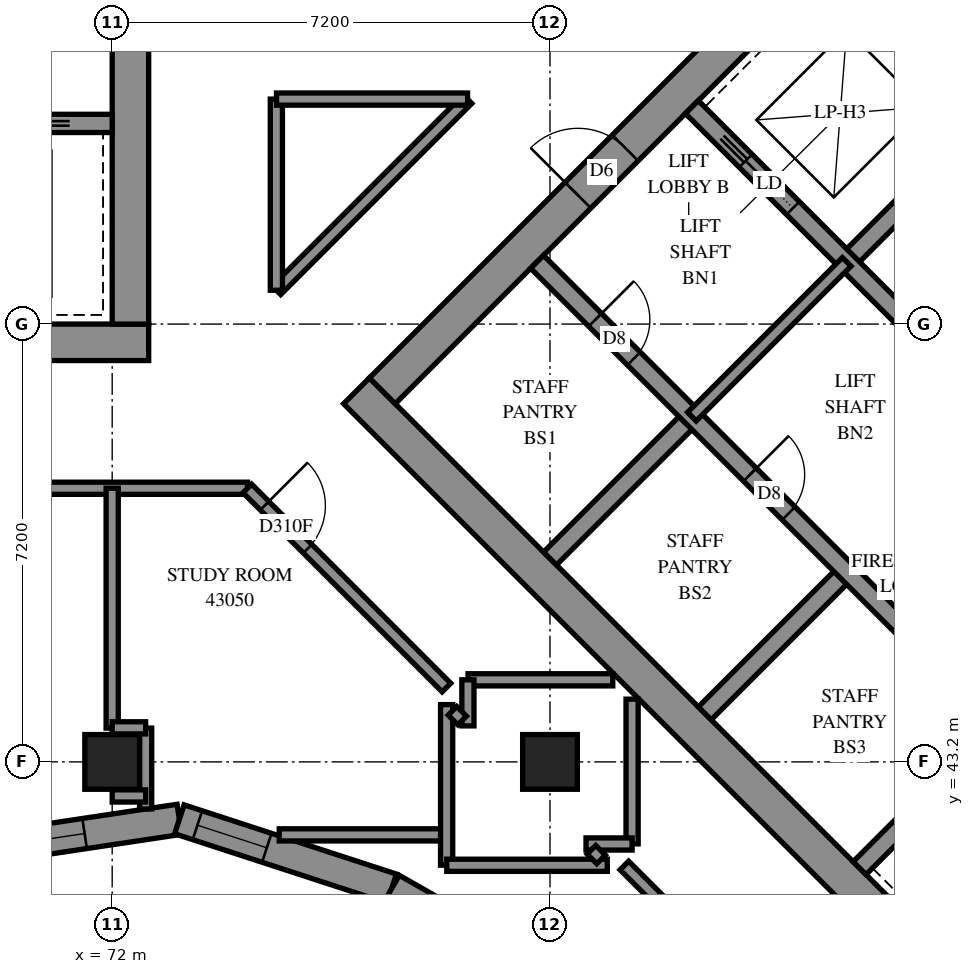
"""IFC4 building model, lengths in metres.
Left out: names, types, materials, properties, quantities, classifications, styles, units other than length and angle.
Written with IfcOpenShell. Run it as: python <this file> out.ifc"""

import sys

from ifc_helpers import new_model, si_unit, direction, frame, frame_2d, origin, origin_2d, place, context, subcontext, project, spatial, polyline, rectangle, outline, extrude, element, fill, save


model = new_model("IFC4")
c1 = context("Model", 3, precision=1e-05, world=origin(), true_north=direction((0.0, 1.0)))
c2 = subcontext(c1, "Body", "Model", "MODEL_VIEW")
j1 = project(units=[si_unit("LENGTHUNIT", "METRE"), si_unit("PLANEANGLEUNIT", "RADIAN")], contexts=[c1])
p1 = place(None, origin())
s1 = spatial("IfcSite", under=j1, at=p1, CompositionType="ELEMENT")
p2 = place(p1, origin())
s2 = spatial("IfcBuilding", under=s1, at=p2, CompositionType="ELEMENT")
p3 = place(p2, frame((0.0, 0.0, 159.2)))
s3 = spatial("IfcBuildingStorey", under=s2, at=p3, CompositionType="ELEMENT", Elevation=159.2)
for number, where, z_axis, x_axis in (
    (1, (72.0, 43.2, 0.0), (0.0, 0.0, 1.0), (1.0, 0.0, 0.0)),
    (2, (79.2, 43.2, 0.0), (0.0, 0.0, 1.0), (1.0, 0.0, 0.0)),
):
    element("IfcColumn", number, at=place(p3, frame(where, z_axis=z_axis, x_axis=x_axis)), inside=s3, PredefinedType="COLUMN", context=c2, shape_type="SweptSolid", body=[
        extrude(rectangle(XDim=0.9, YDim=0.9, at=origin_2d()), origin(), (0.0, 0.0, 1.0), 3.1),
    ])
p4 = place(p3, frame((57.0, 50.1, -0.3), z_axis=(0.0, 0.0, 1.0), x_axis=(1.0, 0.0, 0.0)))
e3 = element("IfcWall", 3, at=p4, inside=s3, PredefinedType="SHEAR", context=c2, shape_type="SweptSolid", body=[
    extrude(rectangle(XDim=15.6, YDim=0.6, at=frame_2d((7.8, 0.0))), origin(), (0.0, 0.0, 1.0), 2.7),
])
p5 = place(p3, frame((72.3, 50.4, -0.3), z_axis=(0.0, 0.0, 1.0), x_axis=(0.0, 1.0, 0.0)))
e4 = element("IfcWall", 4, at=p5, inside=s3, PredefinedType="SHEAR", context=c2, shape_type="SweptSolid", body=[
    extrude(rectangle(XDim=14.4, YDim=0.6, at=frame_2d((7.2, 0.0))), origin(), (0.0, 0.0, 1.0), 2.7),
])
p6 = place(p5, frame((4.55, 0.0, 0.3)))
e5 = element("IfcOpeningElement", 5, at=p6, cuts=e4, PredefinedType="OPENING", context=c2, shape_type="SweptSolid", body=[
    extrude(rectangle(XDim=1.1, YDim=2.1, at=frame_2d((0.55, 1.05))), frame((0.0, 0.31, 0.0), z_axis=(0.0, -1.0, 0.0), x_axis=(1.0, 0.0, 0.0)), (0.0, 0.0, 1.0), 0.62),
])
p7 = place(p5, frame((11.35, 0.0, 0.3)))
e6 = element("IfcOpeningElement", 6, at=p7, cuts=e4, PredefinedType="OPENING", context=c2, shape_type="SweptSolid", body=[
    extrude(rectangle(XDim=1.1, YDim=2.1, at=frame_2d((0.55, 1.05))), frame((0.0, 0.31, 0.0), z_axis=(0.0, -1.0, 0.0), x_axis=(1.0, 0.0, 0.0)), (0.0, 0.0, 1.0), 0.62),
])
p8 = place(p3, frame((57.6, 53.7, 0.0), z_axis=(0.0, 0.0, 1.0), x_axis=(1.0, 0.0, 0.0)))
e7 = element("IfcWall", 7, at=p8, inside=s3, PredefinedType="SOLIDWALL", context=c2, shape_type="SweptSolid", body=[
    extrude(rectangle(XDim=14.4, YDim=0.3, at=frame_2d((7.2, 0.0))), origin(), (0.0, 0.0, 1.0), 3.1),
])
p9 = place(p8, frame((1.35, 0.0, 0.0)))
e8 = element("IfcOpeningElement", 8, at=p9, cuts=e7, PredefinedType="OPENING", context=c2, shape_type="SweptSolid", body=[
    extrude(rectangle(XDim=0.9, YDim=2.1, at=frame_2d((0.45, 1.05))), frame((0.0, 0.16, 0.0), z_axis=(0.0, -1.0, 0.0), x_axis=(1.0, 0.0, 0.0)), (0.0, 0.0, 1.0), 0.32),
])
p10 = place(p8, frame((4.95, 0.0, 0.0)))
e9 = element("IfcOpeningElement", 9, at=p10, cuts=e7, PredefinedType="OPENING", context=c2, shape_type="SweptSolid", body=[
    extrude(rectangle(XDim=0.9, YDim=2.1, at=frame_2d((0.45, 1.05))), frame((0.0, 0.16, 0.0), z_axis=(0.0, -1.0, 0.0), x_axis=(1.0, 0.0, 0.0)), (0.0, 0.0, 1.0), 0.32),
])
p11 = place(p8, frame((8.55, 0.0, 0.0)))
e10 = element("IfcOpeningElement", 10, at=p11, cuts=e7, PredefinedType="OPENING", context=c2, shape_type="SweptSolid", body=[
    extrude(rectangle(XDim=0.9, YDim=2.1, at=frame_2d((0.45, 1.05))), frame((0.0, 0.16, 0.0), z_axis=(0.0, -1.0, 0.0), x_axis=(1.0, 0.0, 0.0)), (0.0, 0.0, 1.0), 0.32),
])
p12 = place(p8, frame((12.05, 0.0, 0.0)))
e11 = element("IfcOpeningElement", 11, at=p12, cuts=e7, PredefinedType="OPENING", context=c2, shape_type="SweptSolid", body=[
    extrude(rectangle(XDim=1.1, YDim=2.1, at=frame_2d((0.55, 1.05))), frame((0.0, 0.16, 0.0), z_axis=(0.0, -1.0, 0.0), x_axis=(1.0, 0.0, 0.0)), (0.0, 0.0, 1.0), 0.32),
])
p13 = place(p3, frame((76.018, 49.302, -0.3), z_axis=(0.0, 0.0, 1.0), x_axis=(0.7071067812, -0.7071067812, 0.0)))
e12 = element("IfcWall", 12, at=p13, inside=s3, PredefinedType="SHEAR", context=c2, shape_type="SweptSolid", body=[
    extrude(rectangle(XDim=15.6, YDim=0.6, at=frame_2d((7.8, 0.0))), origin(), (0.0, 0.0, 1.0), 2.7),
])
p14 = place(p3, frame((76.442, 49.302, -0.3), z_axis=(0.0, 0.0, 1.0), x_axis=(0.7071067812, 0.7071067812, 0.0)))
e13 = element("IfcWall", 13, at=p14, inside=s3, PredefinedType="SHEAR", context=c2, shape_type="SweptSolid", body=[
    extrude(rectangle(XDim=14.4, YDim=0.6, at=frame_2d((7.2, 0.0))), origin(), (0.0, 0.0, 1.0), 2.7),
])
p15 = place(p14, frame((4.55, 0.0, 0.3)))
e14 = element("IfcOpeningElement", 14, at=p15, cuts=e13, PredefinedType="OPENING", context=c2, shape_type="SweptSolid", body=[
    extrude(rectangle(XDim=1.1, YDim=2.1, at=frame_2d((0.55, 1.05))), frame((0.0, 0.31, 0.0), z_axis=(0.0, -1.0, 0.0), x_axis=(1.0, 0.0, 0.0)), (0.0, 0.0, 1.0), 0.62),
])
p16 = place(p14, frame((11.35, 0.0, 0.3)))
e15 = element("IfcOpeningElement", 15, at=p16, cuts=e13, PredefinedType="OPENING", context=c2, shape_type="SweptSolid", body=[
    extrude(rectangle(XDim=1.1, YDim=2.1, at=frame_2d((0.55, 1.05))), frame((0.0, 0.31, 0.0), z_axis=(0.0, -1.0, 0.0), x_axis=(1.0, 0.0, 0.0)), (0.0, 0.0, 1.0), 0.62),
])
for number, where, z_axis, x_axis in (
    (16, (79.2, 46.544, 0.0), (0.0, 0.0, 1.0), (0.707, 0.707, 0.0)),
    (17, (84.079, 51.423, 0.0), (0.0, 0.0, 1.0), (0.707, 0.707, 0.0)),
):
    element("IfcWall", number, at=place(p3, frame(where, z_axis=z_axis, x_axis=x_axis)), inside=s3, PredefinedType="SOLIDWALL", context=c2, shape_type="SweptSolid", body=[
        extrude(rectangle(XDim=3.3, YDim=0.3, at=frame_2d((1.65, 0.0))), origin(), (0.0, 0.0, 1.0), 3.1),
    ])
for number, where, z_axis, x_axis in (
    (18, (81.746, 43.999, 0.0), (0.0, 0.0, 1.0), (0.707, 0.707, 0.0)),
    (19, (84.291, 41.453, 0.0), (0.0, 0.0, 1.0), (0.707, 0.707, 0.0)),
):
    element("IfcWall", number, at=place(p3, frame(where, z_axis=z_axis, x_axis=x_axis)), inside=s3, PredefinedType="SOLIDWALL", context=c2, shape_type="SweptSolid", body=[
        extrude(rectangle(XDim=3.3, YDim=0.3, at=frame_2d((1.65, 0.0))), origin(), (0.0, 0.0, 1.0), 3.1),
    ])
p17 = place(p3, frame((78.988, 51.423, 0.0), z_axis=(0.0, 0.0, 1.0), x_axis=(0.7071067812, -0.7071067812, 0.0)))
e20 = element("IfcWall", 20, at=p17, inside=s3, PredefinedType="SOLIDWALL", context=c2, shape_type="SweptSolid", body=[
    extrude(rectangle(XDim=14.4, YDim=0.3, at=frame_2d((7.2, 0.0))), origin(), (0.0, 0.0, 1.0), 3.1),
])
p18 = place(p17, frame((1.35, 0.0, 0.0)))
e21 = element("IfcOpeningElement", 21, at=p18, cuts=e20, PredefinedType="OPENING", context=c2, shape_type="SweptSolid", body=[
    extrude(rectangle(XDim=0.9, YDim=2.1, at=frame_2d((0.45, 1.05))), frame((0.0, 0.16, 0.0), z_axis=(0.0, -1.0, 0.0), x_axis=(1.0, 0.0, 0.0)), (0.0, 0.0, 1.0), 0.32),
])
p19 = place(p17, frame((4.95, 0.0, 0.0)))
e22 = element("IfcOpeningElement", 22, at=p19, cuts=e20, PredefinedType="OPENING", context=c2, shape_type="SweptSolid", body=[
    extrude(rectangle(XDim=0.9, YDim=2.1, at=frame_2d((0.45, 1.05))), frame((0.0, 0.16, 0.0), z_axis=(0.0, -1.0, 0.0), x_axis=(1.0, 0.0, 0.0)), (0.0, 0.0, 1.0), 0.32),
])
p20 = place(p17, frame((8.55, 0.0, 0.0)))
e23 = element("IfcOpeningElement", 23, at=p20, cuts=e20, PredefinedType="OPENING", context=c2, shape_type="SweptSolid", body=[
    extrude(rectangle(XDim=0.9, YDim=2.1, at=frame_2d((0.45, 1.05))), frame((0.0, 0.16, 0.0), z_axis=(0.0, -1.0, 0.0), x_axis=(1.0, 0.0, 0.0)), (0.0, 0.0, 1.0), 0.32),
])
p21 = place(p17, frame((12.05, 0.0, 0.0)))
e24 = element("IfcOpeningElement", 24, at=p21, cuts=e20, PredefinedType="OPENING", context=c2, shape_type="SweptSolid", body=[
    extrude(rectangle(XDim=1.1, YDim=2.1, at=frame_2d((0.55, 1.05))), frame((0.0, 0.16, 0.0), z_axis=(0.0, -1.0, 0.0), x_axis=(1.0, 0.0, 0.0)), (0.0, 0.0, 1.0), 0.32),
])
p22 = place(p3, frame((81.534, 53.969, 0.0), z_axis=(0.0, 0.0, 1.0), x_axis=(0.707103309, -0.7071102534, 0.0)))
e25 = element("IfcWall", 25, at=p22, inside=s3, PredefinedType="SOLIDWALL", context=c2, shape_type="SweptSolid", body=[
    extrude(rectangle(XDim=14.4, YDim=0.3, at=frame_2d((7.2, 0.0))), origin(), (0.0, 0.0, 1.0), 3.1),
])
p23 = place(p22, frame((1.25, 0.0, 0.0)))
e26 = element("IfcOpeningElement", 26, at=p23, cuts=e25, PredefinedType="OPENING", context=c2, shape_type="SweptSolid", body=[
    extrude(rectangle(XDim=1.1, YDim=2.1, at=frame_2d((0.55, 1.05))), frame((0.0, 0.16, 0.0), z_axis=(0.0, -1.0, 0.0), x_axis=(1.0, 0.0, 0.0)), (0.0, 0.0, 1.0), 0.32),
])
p24 = place(p22, frame((4.85, 0.0, 0.0)))
e27 = element("IfcOpeningElement", 27, at=p24, cuts=e25, PredefinedType="OPENING", context=c2, shape_type="SweptSolid", body=[
    extrude(rectangle(XDim=1.1, YDim=2.1, at=frame_2d((0.55, 1.05))), frame((0.0, 0.16, 0.0), z_axis=(0.0, -1.0, 0.0), x_axis=(1.0, 0.0, 0.0)), (0.0, 0.0, 1.0), 0.32),
])
p25 = place(p22, frame((8.45, 0.0, 0.0)))
e28 = element("IfcOpeningElement", 28, at=p25, cuts=e25, PredefinedType="OPENING", context=c2, shape_type="SweptSolid", body=[
    extrude(rectangle(XDim=1.1, YDim=2.1, at=frame_2d((0.55, 1.05))), frame((0.0, 0.16, 0.0), z_axis=(0.0, -1.0, 0.0), x_axis=(1.0, 0.0, 0.0)), (0.0, 0.0, 1.0), 0.32),
])
p26 = place(p22, frame((12.05, 0.0, 0.0)))
e29 = element("IfcOpeningElement", 29, at=p26, cuts=e25, PredefinedType="OPENING", context=c2, shape_type="SweptSolid", body=[
    extrude(rectangle(XDim=1.1, YDim=2.1, at=frame_2d((0.55, 1.05))), frame((0.0, 0.16, 0.0), z_axis=(0.0, -1.0, 0.0), x_axis=(1.0, 0.0, 0.0)), (0.0, 0.0, 1.0), 0.32),
])
p27 = place(p3, frame((83.867, 56.302, 0.0), z_axis=(0.0, 0.0, 1.0), x_axis=(0.7071137256, -0.7070998367, 0.0)))
e30 = element("IfcWall", 30, at=p27, inside=s3, PredefinedType="SOLIDWALL", context=c2, shape_type="SweptSolid", body=[
    extrude(rectangle(XDim=7.2, YDim=0.3, at=frame_2d((3.6, 0.0))), origin(), (0.0, 0.0, 1.0), 3.1),
])
p28 = place(p3, frame((69.671, 41.741, 0.0), z_axis=(0.0, 0.0, 1.0), x_axis=(0.9889270545, 0.1484024288, 0.0)))
e31 = element("IfcWall", 31, at=p28, inside=s3, PredefinedType="SOLIDWALL", context=c2, shape_type="SweptSolid", body=[
    extrude(outline(polyline([(-0.037, -0.25), (3.413, -0.25), (3.531, 0.25), (0.037, 0.25), (-0.037, -0.25)])), origin(), (0.0, 0.0, 1.0), 3.1),
])
p29 = place(p28, frame((0.696, 0.0, 0.45)))
e32 = element("IfcOpeningElement", 32, at=p29, cuts=e31, PredefinedType="OPENING", context=c2, shape_type="SweptSolid", body=[
    extrude(rectangle(XDim=1.2, YDim=2.5, at=frame_2d((0.6, 1.25))), frame((0.0, 0.26, 0.0), z_axis=(0.0, -1.0, 0.0), x_axis=(1.0, 0.0, 0.0)), (0.0, 0.0, 1.0), 0.52),
])
p30 = place(p3, frame((73.105, 42.256, 0.0), z_axis=(0.0, 0.0, 1.0), x_axis=(0.9507748373, -0.3098825725, 0.0)))
e33 = element("IfcWall", 33, at=p30, inside=s3, PredefinedType="SOLIDWALL", context=c2, shape_type="SweptSolid", body=[
    extrude(outline(polyline([(0.059, -0.25), (3.648, -0.25), (3.698, 0.25), (-0.059, 0.25), (0.059, -0.25)])), origin(), (0.0, 0.0, 1.0), 3.1),
])
p31 = place(p30, frame((0.312, 0.0, 0.45)))
e34 = element("IfcOpeningElement", 34, at=p31, cuts=e33, PredefinedType="OPENING", context=c2, shape_type="SweptSolid", body=[
    extrude(rectangle(XDim=1.2, YDim=2.5, at=frame_2d((0.6, 1.25))), frame((0.0, 0.26, 0.0), z_axis=(0.0, -1.0, 0.0), x_axis=(1.0, 0.0, 0.0)), (0.0, 0.0, 1.0), 0.52),
])
p32 = place(p3, frame((76.597, 41.118, 0.0), z_axis=(0.0, 0.0, 1.0), x_axis=(0.8690276155, -0.4947635835, 0.0)))
e35 = element("IfcWall", 35, at=p32, inside=s3, PredefinedType="SOLIDWALL", context=c2, shape_type="SweptSolid", body=[
    extrude(outline(polyline([(0.025, -0.25), (4.227, -0.25), (4.327, 0.25), (-0.025, 0.25), (0.025, -0.25)])), origin(), (0.0, 0.0, 1.0), 3.1),
])
p33 = place(p32, frame((0.732, 0.0, 0.45)))
e36 = element("IfcOpeningElement", 36, at=p33, cuts=e35, PredefinedType="OPENING", context=c2, shape_type="SweptSolid", body=[
    extrude(rectangle(XDim=1.2, YDim=2.5, at=frame_2d((0.6, 1.25))), frame((0.0, 0.26, 0.0), z_axis=(0.0, -1.0, 0.0), x_axis=(1.0, 0.0, 0.0)), (0.0, 0.0, 1.0), 0.52),
])
p34 = place(p32, frame((2.27, 0.0, 0.45)))
e37 = element("IfcOpeningElement", 37, at=p34, cuts=e35, PredefinedType="OPENING", context=c2, shape_type="SweptSolid", body=[
    extrude(rectangle(XDim=1.2, YDim=2.5, at=frame_2d((0.6, 1.25))), frame((0.0, 0.26, 0.0), z_axis=(0.0, -1.0, 0.0), x_axis=(1.0, 0.0, 0.0)), (0.0, 0.0, 1.0), 0.52),
])
p35 = place(p3, frame((81.534, 48.878, 0.0), z_axis=(0.0, 0.0, 1.0), x_axis=(0.707092892, 0.7071206701, 0.0)))
e38 = element("IfcWall", 38, at=p35, inside=s3, PredefinedType="PARTITIONING", context=c2, shape_type="SweptSolid", body=[
    extrude(rectangle(XDim=3.6, YDim=0.2, at=frame_2d((1.8, 0.0))), origin(), (0.0, 0.0, 1.0), 3.1),
])
p36 = place(p3, frame((54.9, 47.7, 0.0), z_axis=(0.0, 0.0, 1.0), x_axis=(1.0, 0.0, 0.0)))
e39 = element("IfcWall", 39, at=p36, inside=s3, PredefinedType="PARTITIONING", context=c2, shape_type="SweptSolid", body=[
    extrude(rectangle(XDim=19.326, YDim=0.2, at=frame_2d((9.663, 0.0))), origin(), (0.0, 0.0, 1.0), 3.1),
])
p37 = place(p36, frame((6.599, 0.0, 0.0)))
e40 = element("IfcOpeningElement", 40, at=p37, cuts=e39, PredefinedType="OPENING", context=c2, shape_type="SweptSolid", body=[
    extrude(rectangle(XDim=0.9, YDim=2.1, at=frame_2d((0.45, 1.05))), frame((0.0, 0.11, 0.0), z_axis=(0.0, -1.0, 0.0), x_axis=(1.0, 0.0, 0.0)), (0.0, 0.0, 1.0), 0.22),
])
p38 = place(p36, frame((14.101, 0.0, 0.0)))
e41 = element("IfcOpeningElement", 41, at=p38, cuts=e39, PredefinedType="OPENING", context=c2, shape_type="SweptSolid", body=[
    extrude(rectangle(XDim=0.9, YDim=2.1, at=frame_2d((0.45, 1.05))), frame((0.0, 0.11, 0.0), z_axis=(0.0, -1.0, 0.0), x_axis=(1.0, 0.0, 0.0)), (0.0, 0.0, 1.0), 0.22),
])
p39 = place(p3, frame((80.423, 41.497, 0.0), z_axis=(0.0, 0.0, 1.0), x_axis=(0.7071067812, -0.7071067812, 0.0)))
e42 = element("IfcWall", 42, at=p39, inside=s3, PredefinedType="PARTITIONING", context=c2, shape_type="SweptSolid", body=[
    extrude(rectangle(XDim=9.065, YDim=0.2, at=frame_2d((4.532, 0.0))), origin(), (0.0, 0.0, 1.0), 3.1),
])
p40 = place(p3, frame((74.223, 47.697, 0.0), z_axis=(0.0, 0.0, 1.0), x_axis=(0.7071067812, -0.7071067812, 0.0)))
e43 = element("IfcWall", 43, at=p40, inside=s3, PredefinedType="PARTITIONING", context=c2, shape_type="SweptSolid", body=[
    extrude(rectangle(XDim=4.63, YDim=0.2, at=frame_2d((2.315, 0.0))), origin(), (0.0, 0.0, 1.0), 3.1),
])
p41 = place(p40, frame((0.401, 0.0, 0.0)))
e44 = element("IfcOpeningElement", 44, at=p41, cuts=e43, PredefinedType="OPENING", context=c2, shape_type="SweptSolid", body=[
    extrude(rectangle(XDim=1.0, YDim=2.1, at=frame_2d((0.5, 1.05))), frame((0.0, 0.11, 0.0), z_axis=(0.0, -1.0, 0.0), x_axis=(1.0, 0.0, 0.0)), (0.0, 0.0, 1.0), 0.22),
])
p42 = place(p3, frame((74.701, 50.957, 0.0), z_axis=(0.0, 0.0, 1.0), x_axis=(0.7071067812, 0.7071067812, 0.0)))
e45 = element("IfcWall", 45, at=p42, inside=s3, PredefinedType="PARTITIONING", context=c2, shape_type="SweptSolid", body=[
    extrude(rectangle(XDim=4.444, YDim=0.2, at=frame_2d((2.222, 0.0))), origin(), (0.0, 0.0, 1.0), 3.1),
])
p43 = place(p3, frame((72.0, 43.756, 0.0), z_axis=(0.0, 0.0, 1.0), x_axis=(0.0, 1.0, 0.0)))
e46 = element("IfcWall", 46, at=p43, inside=s3, PredefinedType="PARTITIONING", context=c2, shape_type="SweptSolid", body=[
    extrude(rectangle(XDim=3.944, YDim=0.2, at=frame_2d((1.972, 0.0))), origin(), (0.0, 0.0, 1.0), 3.1),
])
p44 = place(p3, frame((74.7, 50.956, 0.0), z_axis=(0.0, 0.0, 1.0), x_axis=(0.0, 1.0, 0.0)))
e47 = element("IfcWall", 47, at=p44, inside=s3, PredefinedType="PARTITIONING", context=c2, shape_type="SweptSolid", body=[
    extrude(rectangle(XDim=3.144, YDim=0.2, at=frame_2d((1.572, 0.0))), origin(), (0.0, 0.0, 1.0), 3.1),
])
p45 = place(p3, frame((74.702, 54.1, 0.0), z_axis=(0.0, 0.0, 1.0), x_axis=(1.0, 0.0, 0.0)))
e48 = element("IfcWall", 48, at=p45, inside=s3, PredefinedType="PARTITIONING", context=c2, shape_type="SweptSolid", body=[
    extrude(rectangle(XDim=3.142, YDim=0.2, at=frame_2d((1.571, 0.0))), origin(), (0.0, 0.0, 1.0), 3.1),
])
p46 = place(p3, frame((74.747, 42.0, 0.0), z_axis=(0.0, 0.0, 1.0), x_axis=(1.0, 0.0, 0.0)))
e49 = element("IfcWall", 49, at=p46, inside=s3, PredefinedType="PARTITIONING", context=c2, shape_type="SweptSolid", body=[
    extrude(rectangle(XDim=2.753, YDim=0.2, at=frame_2d((1.377, 0.0))), origin(), (0.0, 0.0, 1.0), 3.1),
])
for number, where, z_axis, x_axis in (
    (50, (77.5, 41.502, 0.0), (0.0, 0.0, 1.0), (0.0, 1.0, 0.0)),
    (51, (77.502, 41.5, 0.0), (0.0, 0.0, 1.0), (1.0, 0.0, 0.0)),
):
    element("IfcWall", number, at=place(p3, frame(where, z_axis=z_axis, x_axis=x_axis)), inside=s3, PredefinedType="PARTITIONING", context=c2, shape_type="SweptSolid", body=[
        extrude(rectangle(XDim=2.64, YDim=0.2, at=frame_2d((1.32, 0.0))), origin(), (0.0, 0.0, 1.0), 3.1),
    ])
for number, where, z_axis, x_axis in (
    (52, (80.55, 41.852, 0.0), (0.0, 0.0, 1.0), (0.0, 1.0, 0.0)),
    (53, (77.852, 44.55, 0.0), (0.0, 0.0, 1.0), (1.0, 0.0, 0.0)),
):
    element("IfcWall", number, at=place(p3, frame(where, z_axis=z_axis, x_axis=x_axis)), inside=s3, PredefinedType="PARTITIONING", context=c2, shape_type="SweptSolid", body=[
        extrude(rectangle(XDim=2.38, YDim=0.2, at=frame_2d((1.19, 0.0))), origin(), (0.0, 0.0, 1.0), 3.1),
    ])
p47 = place(p3, frame((72.55, 42.426, 0.0), z_axis=(0.0, 0.0, 1.0), x_axis=(0.0, 1.0, 0.0)))
e54 = element("IfcWall", 54, at=p47, inside=s3, PredefinedType="PARTITIONING", context=c2, shape_type="SweptSolid", body=[
    extrude(rectangle(XDim=1.33, YDim=0.2, at=frame_2d((0.665, 0.0))), origin(), (0.0, 0.0, 1.0), 3.1),
])
for number, where, z_axis, x_axis in (
    (55, (77.85, 43.792, 0.0), (0.0, 0.0, 1.0), (0.0, 1.0, 0.0)),
    (56, (79.792, 41.85, 0.0), (0.0, 0.0, 1.0), (1.0, 0.0, 0.0)),
):
    element("IfcWall", number, at=place(p3, frame(where, z_axis=z_axis, x_axis=x_axis)), inside=s3, PredefinedType="PARTITIONING", context=c2, shape_type="SweptSolid", body=[
        extrude(rectangle(XDim=0.758, YDim=0.2, at=frame_2d((0.379, 0.0))), origin(), (0.0, 0.0, 1.0), 3.1),
    ])
for number, where, z_axis, x_axis in (
    (57, (72.0, 43.76, 0.0), (0.0, 0.0, 1.0), (1.0, 0.0, 0.0)),
    (58, (72.0, 42.64, 0.0), (0.0, 0.0, 1.0), (1.0, 0.0, 0.0)),
):
    element("IfcWall", number, at=place(p3, frame(where, z_axis=z_axis, x_axis=x_axis)), inside=s3, PredefinedType="PARTITIONING", context=c2, shape_type="SweptSolid", body=[
        extrude(rectangle(XDim=0.55, YDim=0.2, at=frame_2d((0.275, 0.0))), origin(), (0.0, 0.0, 1.0), 3.1),
    ])
for number, where, z_axis, x_axis in (
    (59, (79.881, 41.755, 0.0), (0.0, 0.0, 1.0), (0.707, -0.707, 0.0)),
    (60, (77.596, 44.04, 0.0), (0.0, 0.0, 1.0), (0.707, -0.707, 0.0)),
):
    element("IfcWall", number, at=place(p3, frame(where, z_axis=z_axis, x_axis=x_axis)), inside=s3, PredefinedType="PARTITIONING", context=c2, shape_type="SweptSolid", body=[
        extrude(rectangle(XDim=0.225, YDim=0.2, at=frame_2d((0.113, 0.0))), origin(), (0.0, 0.0, 1.0), 3.1),
    ])
p48 = place(p29, origin())
e61 = element("IfcWindow", 61, at=p48, inside=s3, PartitioningType="SINGLE_PANEL", PredefinedType="WINDOW", context=c2, shape_type="SweptSolid", body=[
    extrude(rectangle(XDim=1.2, YDim=2.5, at=frame_2d((0.6, 1.25))), frame((0.0, 0.18, 0.0), z_axis=(0.0, -1.0, 0.0), x_axis=(1.0, 0.0, 0.0)), (0.0, 0.0, 1.0), 0.06),
])
fill(e32, e61)
p49 = place(p31, origin())
e62 = element("IfcWindow", 62, at=p49, inside=s3, PartitioningType="SINGLE_PANEL", PredefinedType="WINDOW", context=c2, shape_type="SweptSolid", body=[
    extrude(rectangle(XDim=1.2, YDim=2.5, at=frame_2d((0.6, 1.25))), frame((0.0, 0.18, 0.0), z_axis=(0.0, -1.0, 0.0), x_axis=(1.0, 0.0, 0.0)), (0.0, 0.0, 1.0), 0.06),
])
fill(e34, e62)
p50 = place(p15, origin())
e63 = element("IfcDoor", 63, at=p50, inside=s3, OperationType="DOUBLE_DOOR_SINGLE_SWING", PredefinedType="DOOR", context=c2, shape_type="SweptSolid", body=[
    extrude(rectangle(XDim=1.1, YDim=2.1, at=frame_2d((0.55, 1.05))), frame((0.0, 0.025, 0.0), z_axis=(0.0, -1.0, 0.0), x_axis=(1.0, 0.0, 0.0)), (0.0, 0.0, 1.0), 0.05),
])
fill(e14, e63)
p51 = place(p18, origin())
e64 = element("IfcDoor", 64, at=p51, inside=s3, OperationType="SINGLE_SWING_LEFT", PredefinedType="DOOR", context=c2, shape_type="SweptSolid", body=[
    extrude(rectangle(XDim=0.9, YDim=2.1, at=frame_2d((0.45, 1.05))), frame((0.0, 0.025, 0.0), z_axis=(0.0, -1.0, 0.0), x_axis=(1.0, 0.0, 0.0)), (0.0, 0.0, 1.0), 0.05),
])
fill(e21, e64)
p52 = place(p19, origin())
e65 = element("IfcDoor", 65, at=p52, inside=s3, OperationType="SINGLE_SWING_LEFT", PredefinedType="DOOR", context=c2, shape_type="SweptSolid", body=[
    extrude(rectangle(XDim=0.9, YDim=2.1, at=frame_2d((0.45, 1.05))), frame((0.0, 0.025, 0.0), z_axis=(0.0, -1.0, 0.0), x_axis=(1.0, 0.0, 0.0)), (0.0, 0.0, 1.0), 0.05),
])
fill(e22, e65)
p53 = place(p23, origin())
e66 = element("IfcDoor", 66, at=p53, inside=s3, OperationType="SLIDING_TO_LEFT", PredefinedType="DOOR", context=c2, shape_type="SweptSolid", body=[
    extrude(rectangle(XDim=1.1, YDim=2.1, at=frame_2d((0.55, 1.05))), frame((0.0, 0.025, 0.0), z_axis=(0.0, -1.0, 0.0), x_axis=(1.0, 0.0, 0.0)), (0.0, 0.0, 1.0), 0.05),
])
fill(e26, e66)
p54 = place(p41, origin())
e67 = element("IfcDoor", 67, at=p54, inside=s3, OperationType="SINGLE_SWING_LEFT", PredefinedType="DOOR", context=c2, shape_type="SweptSolid", body=[
    extrude(rectangle(XDim=1.0, YDim=2.1, at=frame_2d((0.5, 1.05))), frame((0.0, 0.025, 0.0), z_axis=(0.0, -1.0, 0.0), x_axis=(1.0, 0.0, 0.0)), (0.0, 0.0, 1.0), 0.05),
])
fill(e44, e67)
save(model, sys.argv[1])
